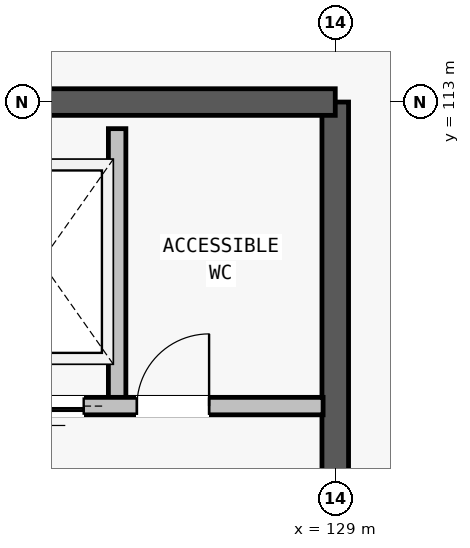
"""IFC4 building model, lengths in metres.
Left out: names, types, materials, properties, quantities, classifications, styles, units other than length and angle.
Written with IfcOpenShell. Run it as: python <this file> out.ifc"""

import sys

from ifc_helpers import new_model, si_unit, direction, frame, frame_2d, origin, place, context, subcontext, project, spatial, rectangle, extrude, element, fill, save


model = new_model("IFC4")
c1 = context("Model", 3, precision=1e-05, world=origin(), true_north=direction((0.0, 1.0)))
c2 = subcontext(c1, "Body", "Model", "MODEL_VIEW")
j1 = project(units=[si_unit("LENGTHUNIT", "METRE"), si_unit("PLANEANGLEUNIT", "RADIAN")], contexts=[c1])
p1 = place(None, origin())
s1 = spatial("IfcSite", under=j1, at=p1, CompositionType="ELEMENT")
p2 = place(p1, origin())
s2 = spatial("IfcBuilding", under=s1, at=p2, CompositionType="ELEMENT")
p3 = place(p2, origin())
s3 = spatial("IfcBuildingStorey", under=s2, at=p3, CompositionType="ELEMENT", Elevation=0.0)
p4 = place(p3, frame((129.0, 104.0, -0.9), z_axis=(0.0, 0.0, 1.0), x_axis=(0.0, 1.0, 0.0)))
e1 = element("IfcWall", 1, at=p4, inside=s3, PredefinedType="SHEAR", context=c2, shape_type="SweptSolid", body=[
    extrude(rectangle(XDim=9.0, YDim=0.35, at=frame_2d((4.5, 0.0))), origin(), (0.0, 0.0, 1.0), 6.22),
])
p5 = place(p4, frame((1.4, 0.0, 0.9)))
e2 = element("IfcOpeningElement", 2, at=p5, cuts=e1, PredefinedType="OPENING", context=c2, shape_type="SweptSolid", body=[
    extrude(rectangle(XDim=1.9, YDim=2.3, at=frame_2d((0.95, 1.15))), frame((0.0, 0.185, 0.0), z_axis=(0.0, -1.0, 0.0), x_axis=(1.0, 0.0, 0.0)), (0.0, 0.0, 1.0), 0.37),
])
p6 = place(p3, frame((129.0, 113.0, -0.9), z_axis=(0.0, 0.0, 1.0), x_axis=(-1.0, 0.0, 0.0)))
e3 = element("IfcWall", 3, at=p6, inside=s3, PredefinedType="SHEAR", context=c2, shape_type="SweptSolid", body=[
    extrude(rectangle(XDim=9.0, YDim=0.35, at=frame_2d((4.5, 0.0))), origin(), (0.0, 0.0, 1.0), 6.22),
])
p7 = place(p3, frame((126.13, 109.0, 0.0), z_axis=(0.0, 0.0, 1.0), x_axis=(0.0, 1.0, 0.0)))
e4 = element("IfcWall", 4, at=p7, inside=s3, PredefinedType="PARTITIONING", context=c2, shape_type="SweptSolid", body=[
    extrude(rectangle(XDim=3.65, YDim=0.23, at=frame_2d((1.825, 0.0))), origin(), (0.0, 0.0, 1.0), 4.2),
])
p8 = place(p3, frame((124.21, 109.0, 0.0), z_axis=(0.0, 0.0, 1.0), x_axis=(1.0, 0.0, 0.0)))
e5 = element("IfcWall", 5, at=p8, inside=s3, PredefinedType="PARTITIONING", context=c2, shape_type="SweptSolid", body=[
    extrude(rectangle(XDim=4.63, YDim=0.23, at=frame_2d((2.315, 0.0))), origin(), (0.0, 0.0, 1.0), 4.2),
])
p9 = place(p8, frame((0.38, 0.0, 0.0)))
e6 = element("IfcOpeningElement", 6, at=p9, cuts=e5, PredefinedType="OPENING", context=c2, shape_type="SweptSolid", body=[
    extrude(rectangle(XDim=1.1, YDim=2.15, at=frame_2d((0.55, 1.075))), frame((0.0, 0.125, 0.0), z_axis=(0.0, -1.0, 0.0), x_axis=(1.0, 0.0, 0.0)), (0.0, 0.0, 1.0), 0.25),
])
p10 = place(p8, frame((2.18, 0.0, 0.0)))
e7 = element("IfcOpeningElement", 7, at=p10, cuts=e5, PredefinedType="OPENING", context=c2, shape_type="SweptSolid", body=[
    extrude(rectangle(XDim=0.95, YDim=2.1, at=frame_2d((0.475, 1.05))), frame((0.0, 0.125, 0.0), z_axis=(0.0, -1.0, 0.0), x_axis=(1.0, 0.0, 0.0)), (0.0, 0.0, 1.0), 0.25),
])
p11 = place(p9, origin())
e8 = element("IfcDoor", 8, at=p11, inside=s3, OperationType="SLIDING_TO_LEFT", PredefinedType="DOOR", context=c2, shape_type="SweptSolid", body=[
    extrude(rectangle(XDim=1.1, YDim=2.15, at=frame_2d((0.55, 1.075))), frame((0.0, 0.025, 0.0), z_axis=(0.0, -1.0, 0.0), x_axis=(1.0, 0.0, 0.0)), (0.0, 0.0, 1.0), 0.05),
])
fill(e6, e8)
p12 = place(p10, origin())
e9 = element("IfcDoor", 9, at=p12, inside=s3, OperationType="SINGLE_SWING_RIGHT", PredefinedType="DOOR", context=c2, shape_type="SweptSolid", body=[
    extrude(rectangle(XDim=0.95, YDim=2.1, at=frame_2d((0.475, 1.05))), frame((0.0, 0.025, 0.0), z_axis=(0.0, -1.0, 0.0), x_axis=(1.0, 0.0, 0.0)), (0.0, 0.0, 1.0), 0.05),
])
fill(e7, e9)
save(model, sys.argv[1])
